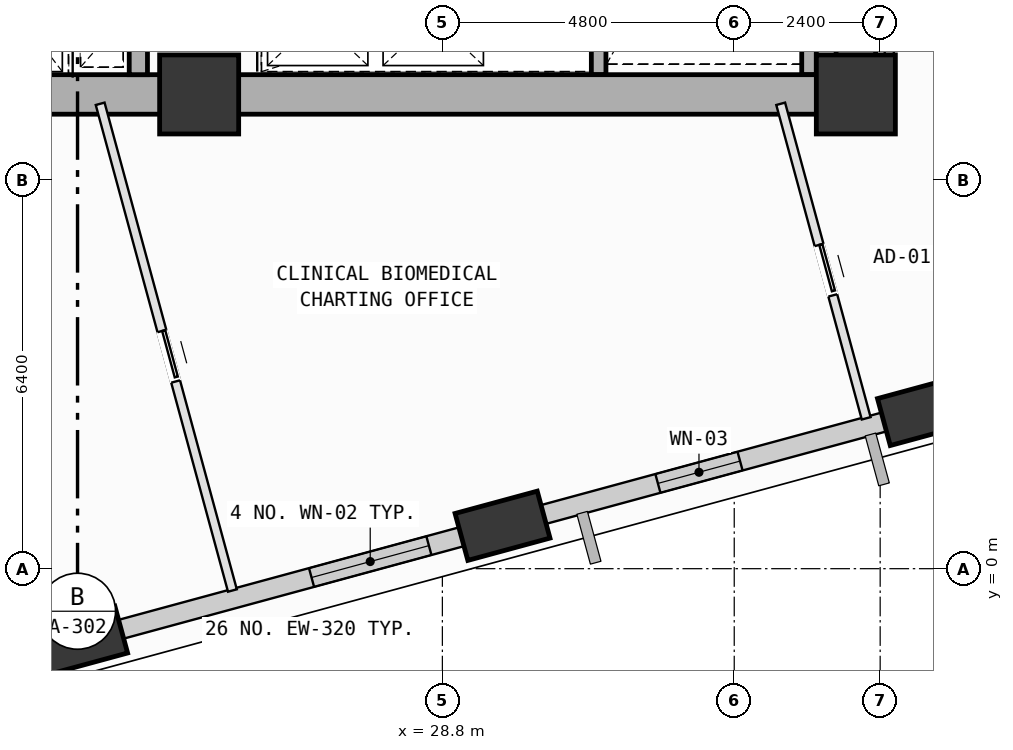
"""IFC4 building model, lengths in metres.
Left out: names, types, materials, properties, quantities, classifications, styles, units other than length and angle.
Written with IfcOpenShell. Run it as: python <this file> out.ifc"""

import sys

from ifc_helpers import new_model, si_unit, direction, frame, frame_2d, origin, origin_2d, place, context, subcontext, project, spatial, rectangle, extrude, element, fill, save


model = new_model("IFC4")
c1 = context("Model", 3, precision=1e-05, world=origin(), true_north=direction((0.0, 1.0)))
c2 = subcontext(c1, "Body", "Model", "MODEL_VIEW")
j1 = project(units=[si_unit("LENGTHUNIT", "METRE"), si_unit("PLANEANGLEUNIT", "RADIAN")], contexts=[c1])
p1 = place(None, origin())
s1 = spatial("IfcSite", under=j1, at=p1, CompositionType="ELEMENT")
p2 = place(p1, origin())
s2 = spatial("IfcBuilding", under=s1, at=p2, CompositionType="ELEMENT")
p3 = place(p2, frame((0.0, 0.0, 88.4)))
s3 = spatial("IfcBuildingStorey", under=s2, at=p3, CompositionType="ELEMENT", Elevation=88.4)
for number, where, z_axis, x_axis in (
    (1, (24.8, 7.8, 0.0), (0.0, 0.0, 1.0), (1.0, 0.0, 0.0)),
    (2, (35.6, 7.8, 0.0), (0.0, 0.0, 1.0), (1.0, 0.0, 0.0)),
):
    element("IfcColumn", number, at=place(p3, frame(where, z_axis=z_axis, x_axis=x_axis)), inside=s3, PredefinedType="COLUMN", context=c2, shape_type="SweptSolid", body=[
        extrude(rectangle(XDim=1.3, YDim=1.3, at=origin_2d()), origin(), (0.0, 0.0, 1.0), 4.0),
    ])
p4 = place(p3, frame((22.843, -1.184, 0.069), z_axis=(0.107373775111, -0.043443182574, 0.99326912884), x_axis=(0.120527614907, 0.992245335413, 0.030369201428)))
e3 = element("IfcColumn", 3, at=p4, inside=s3, PredefinedType="COLUMN", context=c2, shape_type="SweptSolid", body=[
    extrude(rectangle(XDim=1.4, YDim=0.8, at=origin_2d()), origin(), (0.0, 0.0, 1.0), 3.956),
])
p5 = place(p3, frame((29.79, 0.706, 0.06), z_axis=(0.099480422966, -0.014925147153, 0.994927577982), x_axis=(-0.114792101151, 0.993039351459, 0.026374608369)))
e4 = element("IfcColumn", 4, at=p5, inside=s3, PredefinedType="COLUMN", context=c2, shape_type="SweptSolid", body=[
    extrude(rectangle(XDim=1.4, YDim=0.8, at=origin_2d()), origin(), (0.0, 0.0, 1.0), 3.958),
])
p6 = place(p3, frame((36.737, 2.595, 0.055), z_axis=(0.091494482232, 0.013687179957, 0.995711514861), x_axis=(-0.400965338617, 0.91577205319, 0.024255799796)))
e5 = element("IfcColumn", 5, at=p6, inside=s3, PredefinedType="COLUMN", context=c2, shape_type="SweptSolid", body=[
    extrude(rectangle(XDim=1.4, YDim=0.8, at=origin_2d()), origin(), (0.0, 0.0, 1.0), 3.96),
])
p7 = place(p3, frame((29.49, 0.627, 0.0), z_axis=(0.0, 0.0, 1.0), x_axis=(-0.965017319064, -0.262186143622, 0.0)))
e6 = element("IfcWall", 6, at=p7, inside=s3, PredefinedType="SOLIDWALL", context=c2, shape_type="SweptSolid", body=[
    extrude(rectangle(XDim=6.234, YDim=0.32, at=frame_2d((3.117, 0.0))), origin(), (0.0, 0.0, 1.0), 3.165),
])
p8 = place(p7, frame((0.944, 0.0, 0.75)))
e7 = element("IfcOpeningElement", 7, at=p8, cuts=e6, PredefinedType="OPENING", context=c2, shape_type="SweptSolid", body=[
    extrude(rectangle(XDim=2.0, YDim=1.95, at=frame_2d((1.0, 0.975))), frame((0.0, 0.17, 0.0), z_axis=(0.0, -1.0, 0.0), x_axis=(1.0, 0.0, 0.0)), (0.0, 0.0, 1.0), 0.34),
])
p9 = place(p3, frame((36.431, 2.513, 0.0), z_axis=(0.0, 0.0, 1.0), x_axis=(-0.96501271104, -0.26220310359, 0.0)))
e8 = element("IfcWall", 8, at=p9, inside=s3, PredefinedType="SOLIDWALL", context=c2, shape_type="SweptSolid", body=[
    extrude(rectangle(XDim=6.214, YDim=0.32, at=frame_2d((3.107, 0.0))), origin(), (0.0, 0.0, 1.0), 3.165),
])
p10 = place(p9, frame((2.835, 0.0, 0.75)))
e9 = element("IfcOpeningElement", 9, at=p10, cuts=e8, PredefinedType="OPENING", context=c2, shape_type="SweptSolid", body=[
    extrude(rectangle(XDim=1.4, YDim=1.85, at=frame_2d((0.7, 0.925))), frame((0.0, 0.17, 0.0), z_axis=(0.0, -1.0, 0.0), x_axis=(1.0, 0.0, 0.0)), (0.0, 0.0, 1.0), 0.34),
])
for number, where, z_axis, x_axis in (
    (10, (34.83, 15.12, 0.0), (0.0, 0.0, 1.0), (0.0, -1.0, 0.0)),
    (11, (31.37, 8.125, 0.0), (0.0, 0.0, 1.0), (0.0, 1.0, 0.0)),
):
    element("IfcWall", number, at=place(p3, frame(where, z_axis=z_axis, x_axis=x_axis)), inside=s3, PredefinedType="SOLIDWALL", context=c2, shape_type="SweptSolid", body=[
        extrude(rectangle(XDim=6.995, YDim=0.24, at=frame_2d((3.498, 0.0))), origin(), (0.0, 0.0, 1.0), 3.78),
    ])
for number, where, z_axis, x_axis in (
    (12, (14.0, 7.8, 0.0), (0.0, 0.0, 1.0), (1.0, 0.0, 0.0)),
    (13, (24.8, 7.8, 0.0), (0.0, 0.0, 1.0), (1.0, 0.0, 0.0)),
):
    element("IfcWall", number, at=place(p3, frame(where, z_axis=z_axis, x_axis=x_axis)), inside=s3, PredefinedType="SHEAR", context=c2, shape_type="SweptSolid", body=[
        extrude(rectangle(XDim=10.8, YDim=0.65, at=frame_2d((5.4, 0.0))), origin(), (0.0, 0.0, 1.0), 3.78),
    ])
p11 = place(p3, frame((35.6, 7.8, 0.0), z_axis=(0.0, 0.0, 1.0), x_axis=(0.0, 1.0, 0.0)))
e14 = element("IfcWall", 14, at=p11, inside=s3, PredefinedType="SHEAR", context=c2, shape_type="SweptSolid", body=[
    extrude(rectangle(XDim=9.0, YDim=0.65, at=frame_2d((4.5, 0.0))), origin(), (0.0, 0.0, 1.0), 3.78),
])
p12 = place(p3, frame((23.8, 8.125, 0.0), z_axis=(0.0, 0.0, 1.0), x_axis=(0.0, 1.0, 0.0)))
e15 = element("IfcWall", 15, at=p12, inside=s3, PredefinedType="SOLIDWALL", context=c2, shape_type="SweptSolid", body=[
    extrude(rectangle(XDim=2.555, YDim=0.3, at=frame_2d((1.277, 0.0))), origin(), (0.0, 0.0, 1.0), 3.78),
])
p13 = place(p3, frame((23.172, 7.646, 0.0), z_axis=(0.0, 0.0, 1.0), x_axis=(0.262180889196, -0.965018746626, 0.0)))
e16 = element("IfcWall", 16, at=p13, inside=s3, PredefinedType="PARTITIONING", context=c2, shape_type="SweptSolid", body=[
    extrude(rectangle(XDim=8.295, YDim=0.15, at=frame_2d((4.147, 0.0))), origin(), (0.0, 0.0, 1.0), 3.78),
])
p14 = place(p13, frame((3.873, 0.0, 0.0)))
e17 = element("IfcOpeningElement", 17, at=p14, cuts=e16, PredefinedType="OPENING", context=c2, shape_type="SweptSolid", body=[
    extrude(rectangle(XDim=0.86, YDim=2.06, at=frame_2d((0.43, 1.03))), frame((0.0, 0.085, 0.0), z_axis=(0.0, -1.0, 0.0), x_axis=(1.0, 0.0, 0.0)), (0.0, 0.0, 1.0), 0.17),
])
p15 = place(p3, frame((23.534, -1.23, 0.0), z_axis=(0.0, 0.0, 1.0), x_axis=(-0.965027690787, -0.262147965877, 0.0)))
e18 = element("IfcWall", 18, at=p15, inside=s3, PredefinedType="PARTITIONING", context=c2, shape_type="SweptSolid", body=[
    extrude(rectangle(XDim=8.461, YDim=0.15, at=frame_2d((4.23, 0.0))), origin(), (0.0, 0.0, 1.0), 3.165),
])
p16 = place(p3, frame((30.495, 0.662, 0.0), z_axis=(0.0, 0.0, 1.0), x_axis=(-0.964936187414, -0.26248457901, 0.0)))
e19 = element("IfcWall", 19, at=p16, inside=s3, PredefinedType="PARTITIONING", context=c2, shape_type="SweptSolid", body=[
    extrude(rectangle(XDim=0.979, YDim=0.15, at=frame_2d((0.49, 0.0))), origin(), (0.0, 0.0, 1.0), 3.165),
])
p17 = place(p3, frame((34.364, 7.646, 0.0), z_axis=(0.0, 0.0, 1.0), x_axis=(0.262277228578, -0.96499256752, 0.0)))
e20 = element("IfcWall", 20, at=p17, inside=s3, PredefinedType="PARTITIONING", context=c2, shape_type="SweptSolid", body=[
    extrude(rectangle(XDim=5.361, YDim=0.15, at=frame_2d((2.68, 0.0))), origin(), (0.0, 0.0, 1.0), 3.78),
])
p18 = place(p17, frame((2.406, 0.0, 0.0)))
e21 = element("IfcOpeningElement", 21, at=p18, cuts=e20, PredefinedType="OPENING", context=c2, shape_type="SweptSolid", body=[
    extrude(rectangle(XDim=0.86, YDim=2.06, at=frame_2d((0.43, 1.03))), frame((0.0, 0.085, 0.0), z_axis=(0.0, -1.0, 0.0), x_axis=(1.0, 0.0, 0.0)), (0.0, 0.0, 1.0), 0.17),
])
p19 = place(p3, frame((37.449, 2.551, 0.0), z_axis=(0.0, 0.0, 1.0), x_axis=(-0.965019012576, -0.262179910304, 0.0)))
e22 = element("IfcWall", 22, at=p19, inside=s3, PredefinedType="PARTITIONING", context=c2, shape_type="SweptSolid", body=[
    extrude(rectangle(XDim=0.992, YDim=0.15, at=frame_2d((0.496, 0.0))), origin(), (0.0, 0.0, 1.0), 3.145),
])
p20 = place(p3, frame((35.6, 7.5, 0.0), z_axis=(0.0, 0.0, 1.0), x_axis=(1.0, 0.0, 0.0)))
e23 = element("IfcWall", 23, at=p20, inside=s3, PredefinedType="PARTITIONING", context=c2, shape_type="SweptSolid", body=[
    extrude(rectangle(XDim=0.55, YDim=0.15, at=frame_2d((0.275, 0.0))), origin(), (0.0, 0.0, 1.0), 2.745),
])
p21 = place(p3, frame((36.15, 7.5, 0.0), z_axis=(0.0, 0.0, 1.0), x_axis=(0.0, 1.0, 0.0)))
e24 = element("IfcWall", 24, at=p21, inside=s3, PredefinedType="PARTITIONING", context=c2, shape_type="SweptSolid", body=[
    extrude(rectangle(XDim=7.76, YDim=0.15, at=frame_2d((3.88, 0.0))), origin(), (0.0, 0.0, 1.0), 2.765),
])
p22 = place(p8, origin())
e25 = element("IfcWindow", 25, at=p22, inside=s3, PartitioningType="SINGLE_PANEL", PredefinedType="WINDOW", context=c2, shape_type="SweptSolid", body=[
    extrude(rectangle(XDim=2.0, YDim=1.95, at=frame_2d((1.0, 0.975))), frame((0.0, 0.03, 0.0), z_axis=(0.0, -1.0, 0.0), x_axis=(1.0, 0.0, 0.0)), (0.0, 0.0, 1.0), 0.06),
])
fill(e7, e25)
p23 = place(p10, origin())
e26 = element("IfcWindow", 26, at=p23, inside=s3, PartitioningType="SINGLE_PANEL", PredefinedType="WINDOW", context=c2, shape_type="SweptSolid", body=[
    extrude(rectangle(XDim=1.4, YDim=1.85, at=frame_2d((0.7, 0.925))), frame((0.0, 0.03, 0.0), z_axis=(0.0, -1.0, 0.0), x_axis=(1.0, 0.0, 0.0)), (0.0, 0.0, 1.0), 0.06),
])
fill(e9, e26)
p24 = place(p18, origin())
e27 = element("IfcDoor", 27, at=p24, inside=s3, OperationType="SLIDING_TO_LEFT", PredefinedType="DOOR", context=c2, shape_type="SweptSolid", body=[
    extrude(rectangle(XDim=0.86, YDim=2.06, at=frame_2d((0.43, 1.03))), frame((0.0, 0.025, 0.0), z_axis=(0.0, -1.0, 0.0), x_axis=(1.0, 0.0, 0.0)), (0.0, 0.0, 1.0), 0.05),
])
fill(e21, e27)
p25 = place(p14, origin())
e28 = element("IfcDoor", 28, at=p25, inside=s3, OperationType="SLIDING_TO_LEFT", PredefinedType="DOOR", context=c2, shape_type="SweptSolid", body=[
    extrude(rectangle(XDim=0.86, YDim=2.06, at=frame_2d((0.43, 1.03))), frame((0.0, 0.025, 0.0), z_axis=(0.0, -1.0, 0.0), x_axis=(1.0, 0.0, 0.0)), (0.0, 0.0, 1.0), 0.05),
])
fill(e17, e28)
save(model, sys.argv[1])
